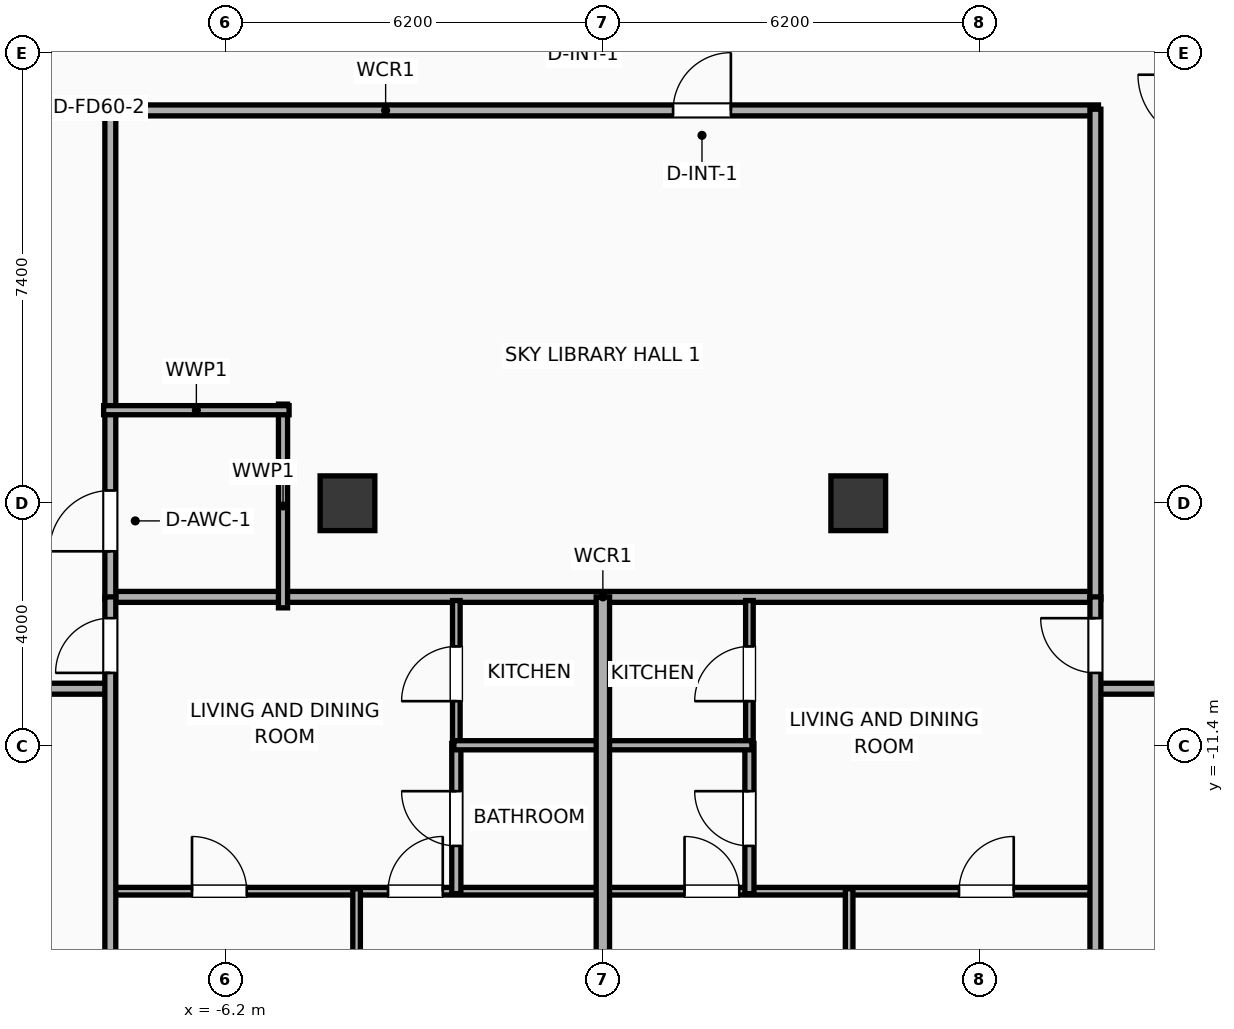
"""IFC4 building model, lengths in metres.
Left out: names, types, materials, properties, quantities, classifications, styles, units other than length and angle.
Written with IfcOpenShell. Run it as: python <this file> out.ifc"""

import sys

from ifc_helpers import new_model, si_unit, direction, frame, frame_2d, origin, origin_2d, place, context, subcontext, project, spatial, rectangle, extrude, element, fill, save


model = new_model("IFC4")
c1 = context("Model", 3, precision=1e-05, world=origin(), true_north=direction((0.0, 1.0)))
c2 = subcontext(c1, "Body", "Model", "MODEL_VIEW")
j1 = project(units=[si_unit("LENGTHUNIT", "METRE"), si_unit("PLANEANGLEUNIT", "RADIAN")], contexts=[c1])
p1 = place(None, origin())
s1 = spatial("IfcSite", under=j1, at=p1, CompositionType="ELEMENT")
p2 = place(p1, origin())
s2 = spatial("IfcBuilding", under=s1, at=p2, CompositionType="ELEMENT")
p3 = place(p2, frame((0.0, 0.0, 156.0)))
s3 = spatial("IfcBuildingStorey", under=s2, at=p3, CompositionType="ELEMENT", Elevation=156.0)
for number, where, z_axis, x_axis in (
    (1, (-4.2, -7.4, 0.0), (0.0, 0.0, 1.0), (1.0, 0.0, 0.0)),
    (2, (4.2, -7.4, 0.0), (0.0, 0.0, 1.0), (1.0, 0.0, 0.0)),
):
    element("IfcColumn", number, at=place(p3, frame(where, z_axis=z_axis, x_axis=x_axis)), inside=s3, PredefinedType="COLUMN", context=c2, shape_type="SweptSolid", body=[
        extrude(rectangle(XDim=0.9, YDim=0.9, at=origin_2d()), origin(), (0.0, 0.0, 1.0), 3.9),
    ])
p4 = place(p3, frame((-8.15, -8.94, 0.0), z_axis=(0.0, 0.0, 1.0), x_axis=(1.0, 0.0, 0.0)))
e3 = element("IfcWall", 3, at=p4, inside=s3, PredefinedType="PARTITIONING", context=c2, shape_type="SweptSolid", body=[
    extrude(rectangle(XDim=16.3, YDim=0.18, at=frame_2d((8.15, 0.0))), origin(), (0.0, 0.0, 1.0), 3.65),
])
p5 = place(p3, frame((-8.15, -0.94, 0.0), z_axis=(0.0, 0.0, 1.0), x_axis=(1.0, 0.0, 0.0)))
e4 = element("IfcWall", 4, at=p5, inside=s3, PredefinedType="PARTITIONING", context=c2, shape_type="SweptSolid", body=[
    extrude(rectangle(XDim=16.3, YDim=0.18, at=frame_2d((8.15, 0.0))), origin(), (0.0, 0.0, 1.0), 3.65),
])
p6 = place(p5, frame((9.305, 0.0, 0.0)))
e5 = element("IfcOpeningElement", 5, at=p6, cuts=e4, PredefinedType="OPENING", context=c2, shape_type="SweptSolid", body=[
    extrude(rectangle(XDim=0.95, YDim=2.05, at=frame_2d((0.475, 1.025))), frame((0.0, 0.1, 0.0), z_axis=(0.0, -1.0, 0.0), x_axis=(1.0, 0.0, 0.0)), (0.0, 0.0, 1.0), 0.2),
])
p7 = place(p3, frame((-8.1, -8.98, 0.0), z_axis=(0.0, 0.0, 1.0), x_axis=(0.0, 1.0, 0.0)))
e6 = element("IfcWall", 6, at=p7, inside=s3, PredefinedType="PARTITIONING", context=c2, shape_type="SweptSolid", body=[
    extrude(rectangle(XDim=8.06, YDim=0.18, at=frame_2d((4.03, 0.0))), origin(), (0.0, 0.0, 1.0), 3.65),
])
p8 = place(p7, frame((0.79, 0.0, 0.0)))
e7 = element("IfcOpeningElement", 7, at=p8, cuts=e6, PredefinedType="OPENING", context=c2, shape_type="SweptSolid", body=[
    extrude(rectangle(XDim=1.0, YDim=2.05, at=frame_2d((0.5, 1.025))), frame((0.0, 0.1, 0.0), z_axis=(0.0, -1.0, 0.0), x_axis=(1.0, 0.0, 0.0)), (0.0, 0.0, 1.0), 0.2),
])
p9 = place(p3, frame((8.1, -8.98, 0.0), z_axis=(0.0, 0.0, 1.0), x_axis=(0.0, 1.0, 0.0)))
e8 = element("IfcWall", 8, at=p9, inside=s3, PredefinedType="PARTITIONING", context=c2, shape_type="SweptSolid", body=[
    extrude(rectangle(XDim=8.06, YDim=0.18, at=frame_2d((4.03, 0.0))), origin(), (0.0, 0.0, 1.0), 3.65),
])
p10 = place(p3, frame((-5.26, -9.12, 0.0), z_axis=(0.0, 0.0, 1.0), x_axis=(0.0, 1.0, 0.0)))
e9 = element("IfcWall", 9, at=p10, inside=s3, PredefinedType="PLUMBINGWALL", context=c2, shape_type="SweptSolid", body=[
    extrude(rectangle(XDim=3.35, YDim=0.15, at=frame_2d((1.675, 0.0))), origin(), (0.0, 0.0, 1.0), 3.65),
])
p11 = place(p3, frame((-8.21, -5.87, 0.0), z_axis=(0.0, 0.0, 1.0), x_axis=(1.0, 0.0, 0.0)))
e10 = element("IfcWall", 10, at=p11, inside=s3, PredefinedType="PLUMBINGWALL", context=c2, shape_type="SweptSolid", body=[
    extrude(rectangle(XDim=3.05, YDim=0.15, at=frame_2d((1.525, 0.0))), origin(), (0.0, 0.0, 1.0), 3.65),
])
p12 = place(p3, frame((-19.75, -10.45, 0.0), z_axis=(0.0, 0.0, 1.0), x_axis=(1.0, 0.0, 0.0)))
e11 = element("IfcWall", 11, at=p12, inside=s3, PredefinedType="PARTITIONING", context=c2, shape_type="SweptSolid", body=[
    extrude(rectangle(XDim=11.67, YDim=0.18, at=frame_2d((5.835, 0.0))), origin(), (0.0, 0.0, 1.0), 3.65),
])
p13 = place(p12, frame((2.664, 0.0, 0.0)))
e12 = element("IfcOpeningElement", 12, at=p13, cuts=e11, PredefinedType="OPENING", context=c2, shape_type="SweptSolid", body=[
    extrude(rectangle(XDim=0.9, YDim=2.05, at=frame_2d((0.45, 1.025))), frame((0.0, 0.1, 0.0), z_axis=(0.0, -1.0, 0.0), x_axis=(1.0, 0.0, 0.0)), (0.0, 0.0, 1.0), 0.2),
])
p14 = place(p12, frame((9.404, 0.0, 0.0)))
e13 = element("IfcOpeningElement", 13, at=p14, cuts=e11, PredefinedType="OPENING", context=c2, shape_type="SweptSolid", body=[
    extrude(rectangle(XDim=1.15, YDim=2.05, at=frame_2d((0.575, 1.025))), frame((0.0, 0.1, 0.0), z_axis=(0.0, -1.0, 0.0), x_axis=(1.0, 0.0, 0.0)), (0.0, 0.0, 1.0), 0.2),
])
p15 = place(p3, frame((8.08, -10.45, 0.0), z_axis=(0.0, 0.0, 1.0), x_axis=(1.0, 0.0, 0.0)))
e14 = element("IfcWall", 14, at=p15, inside=s3, PredefinedType="PARTITIONING", context=c2, shape_type="SweptSolid", body=[
    extrude(rectangle(XDim=11.67, YDim=0.18, at=frame_2d((5.835, 0.0))), origin(), (0.0, 0.0, 1.0), 3.65),
])
p16 = place(p15, frame((1.213, 0.0, 0.0)))
e15 = element("IfcOpeningElement", 15, at=p16, cuts=e14, PredefinedType="OPENING", context=c2, shape_type="SweptSolid", body=[
    extrude(rectangle(XDim=1.15, YDim=2.05, at=frame_2d((0.575, 1.025))), frame((0.0, 0.1, 0.0), z_axis=(0.0, -1.0, 0.0), x_axis=(1.0, 0.0, 0.0)), (0.0, 0.0, 1.0), 0.2),
])
p17 = place(p15, frame((7.057, 0.0, 0.0)))
e16 = element("IfcOpeningElement", 16, at=p17, cuts=e14, PredefinedType="OPENING", context=c2, shape_type="SweptSolid", body=[
    extrude(rectangle(XDim=1.15, YDim=2.05, at=frame_2d((0.575, 1.025))), frame((0.0, 0.1, 0.0), z_axis=(0.0, -1.0, 0.0), x_axis=(1.0, 0.0, 0.0)), (0.0, 0.0, 1.0), 0.2),
])
p18 = place(p3, frame((-8.08, -13.78, 0.0), z_axis=(0.0, 0.0, 1.0), x_axis=(1.0, 0.0, 0.0)))
e17 = element("IfcWall", 17, at=p18, inside=s3, PredefinedType="PARTITIONING", context=c2, shape_type="SweptSolid", body=[
    extrude(rectangle(XDim=8.06, YDim=0.125, at=frame_2d((4.03, 0.0))), origin(), (0.0, 0.0, 1.0), 3.65),
])
p19 = place(p18, frame((1.323, 0.0, 0.0)))
e18 = element("IfcOpeningElement", 18, at=p19, cuts=e17, PredefinedType="OPENING", context=c2, shape_type="SweptSolid", body=[
    extrude(rectangle(XDim=0.9, YDim=2.05, at=frame_2d((0.45, 1.025))), frame((0.0, 0.073, 0.0), z_axis=(0.0, -1.0, 0.0), x_axis=(1.0, 0.0, 0.0)), (0.0, 0.0, 1.0), 0.145),
])
p20 = place(p18, frame((4.547, 0.0, 0.0)))
e19 = element("IfcOpeningElement", 19, at=p20, cuts=e17, PredefinedType="OPENING", context=c2, shape_type="SweptSolid", body=[
    extrude(rectangle(XDim=0.9, YDim=2.05, at=frame_2d((0.45, 1.025))), frame((0.0, 0.073, 0.0), z_axis=(0.0, -1.0, 0.0), x_axis=(1.0, 0.0, 0.0)), (0.0, 0.0, 1.0), 0.145),
])
p21 = place(p3, frame((-2.41, -11.41, 0.0), z_axis=(0.0, 0.0, 1.0), x_axis=(0.0, 1.0, 0.0)))
e20 = element("IfcWall", 20, at=p21, inside=s3, PredefinedType="PARTITIONING", context=c2, shape_type="SweptSolid", body=[
    extrude(rectangle(XDim=2.41, YDim=0.125, at=frame_2d((1.205, 0.0))), origin(), (0.0, 0.0, 1.0), 3.65),
])
p22 = place(p21, frame((0.755, 0.0, 0.0)))
e21 = element("IfcOpeningElement", 21, at=p22, cuts=e20, PredefinedType="OPENING", context=c2, shape_type="SweptSolid", body=[
    extrude(rectangle(XDim=0.9, YDim=2.05, at=frame_2d((0.45, 1.025))), frame((0.0, 0.073, 0.0), z_axis=(0.0, -1.0, 0.0), x_axis=(1.0, 0.0, 0.0)), (0.0, 0.0, 1.0), 0.145),
])
p23 = place(p3, frame((-2.41, -13.82, 0.0), z_axis=(0.0, 0.0, 1.0), x_axis=(0.0, 1.0, 0.0)))
e22 = element("IfcWall", 22, at=p23, inside=s3, PredefinedType="PLUMBINGWALL", context=c2, shape_type="SweptSolid", body=[
    extrude(rectangle(XDim=2.47, YDim=0.15, at=frame_2d((1.235, 0.0))), origin(), (0.0, 0.0, 1.0), 3.65),
])
p24 = place(p23, frame((0.785, 0.0, 0.0)))
e23 = element("IfcOpeningElement", 23, at=p24, cuts=e22, PredefinedType="OPENING", context=c2, shape_type="SweptSolid", body=[
    extrude(rectangle(XDim=0.9, YDim=2.05, at=frame_2d((0.45, 1.025))), frame((0.0, 0.085, 0.0), z_axis=(0.0, -1.0, 0.0), x_axis=(1.0, 0.0, 0.0)), (0.0, 0.0, 1.0), 0.17),
])
p25 = place(p3, frame((-2.45, -11.38, 0.0), z_axis=(0.0, 0.0, 1.0), x_axis=(1.0, 0.0, 0.0)))
e24 = element("IfcWall", 24, at=p25, inside=s3, PredefinedType="PLUMBINGWALL", context=c2, shape_type="SweptSolid", body=[
    extrude(rectangle(XDim=2.43, YDim=0.15, at=frame_2d((1.215, 0.0))), origin(), (0.0, 0.0, 1.0), 3.65),
])
p26 = place(p3, frame((-4.05, -21.031, 0.0), z_axis=(0.0, 0.0, 1.0), x_axis=(0.0, 1.0, 0.0)))
e25 = element("IfcWall", 25, at=p26, inside=s3, PredefinedType="PARTITIONING", context=c2, shape_type="SweptSolid", body=[
    extrude(rectangle(XDim=7.291, YDim=0.125, at=frame_2d((3.646, 0.0))), origin(), (0.0, 0.0, 1.0), 3.65),
])
p27 = place(p3, frame((-8.1, -21.456, 0.0), z_axis=(0.0, 0.0, 1.0), x_axis=(0.0, 1.0, 0.0)))
e26 = element("IfcWall", 26, at=p27, inside=s3, PredefinedType="PARTITIONING", context=c2, shape_type="SweptSolid", body=[
    extrude(rectangle(XDim=12.516, YDim=0.18, at=frame_2d((6.258, 0.0))), origin(), (0.0, 0.0, 1.0), 3.65),
])
p28 = place(p27, frame((11.267, 0.0, 0.0)))
e27 = element("IfcOpeningElement", 27, at=p28, cuts=e26, PredefinedType="OPENING", context=c2, shape_type="SweptSolid", body=[
    extrude(rectangle(XDim=0.9, YDim=2.05, at=frame_2d((0.45, 1.025))), frame((0.0, 0.1, 0.0), z_axis=(0.0, -1.0, 0.0), x_axis=(1.0, 0.0, 0.0)), (0.0, 0.0, 1.0), 0.2),
])
p29 = place(p3, frame((0.02, -13.78, 0.0), z_axis=(0.0, 0.0, 1.0), x_axis=(1.0, 0.0, 0.0)))
e28 = element("IfcWall", 28, at=p29, inside=s3, PredefinedType="PARTITIONING", context=c2, shape_type="SweptSolid", body=[
    extrude(rectangle(XDim=8.06, YDim=0.125, at=frame_2d((4.03, 0.0))), origin(), (0.0, 0.0, 1.0), 3.65),
])
p30 = place(p29, frame((1.323, 0.0, 0.0)))
e29 = element("IfcOpeningElement", 29, at=p30, cuts=e28, PredefinedType="OPENING", context=c2, shape_type="SweptSolid", body=[
    extrude(rectangle(XDim=0.9, YDim=2.05, at=frame_2d((0.45, 1.025))), frame((0.0, 0.073, 0.0), z_axis=(0.0, -1.0, 0.0), x_axis=(1.0, 0.0, 0.0)), (0.0, 0.0, 1.0), 0.145),
])
p31 = place(p29, frame((5.837, 0.0, 0.0)))
e30 = element("IfcOpeningElement", 30, at=p31, cuts=e28, PredefinedType="OPENING", context=c2, shape_type="SweptSolid", body=[
    extrude(rectangle(XDim=0.9, YDim=2.05, at=frame_2d((0.45, 1.025))), frame((0.0, 0.073, 0.0), z_axis=(0.0, -1.0, 0.0), x_axis=(1.0, 0.0, 0.0)), (0.0, 0.0, 1.0), 0.145),
])
p32 = place(p3, frame((2.41, -11.41, 0.0), z_axis=(0.0, 0.0, 1.0), x_axis=(0.0, 1.0, 0.0)))
e31 = element("IfcWall", 31, at=p32, inside=s3, PredefinedType="PARTITIONING", context=c2, shape_type="SweptSolid", body=[
    extrude(rectangle(XDim=2.41, YDim=0.125, at=frame_2d((1.205, 0.0))), origin(), (0.0, 0.0, 1.0), 3.65),
])
p33 = place(p32, frame((0.755, 0.0, 0.0)))
e32 = element("IfcOpeningElement", 32, at=p33, cuts=e31, PredefinedType="OPENING", context=c2, shape_type="SweptSolid", body=[
    extrude(rectangle(XDim=0.9, YDim=2.05, at=frame_2d((0.45, 1.025))), frame((0.0, 0.073, 0.0), z_axis=(0.0, -1.0, 0.0), x_axis=(1.0, 0.0, 0.0)), (0.0, 0.0, 1.0), 0.145),
])
p34 = place(p3, frame((2.41, -13.82, 0.0), z_axis=(0.0, 0.0, 1.0), x_axis=(0.0, 1.0, 0.0)))
e33 = element("IfcWall", 33, at=p34, inside=s3, PredefinedType="PLUMBINGWALL", context=c2, shape_type="SweptSolid", body=[
    extrude(rectangle(XDim=2.47, YDim=0.15, at=frame_2d((1.235, 0.0))), origin(), (0.0, 0.0, 1.0), 3.65),
])
p35 = place(p34, frame((0.785, 0.0, 0.0)))
e34 = element("IfcOpeningElement", 34, at=p35, cuts=e33, PredefinedType="OPENING", context=c2, shape_type="SweptSolid", body=[
    extrude(rectangle(XDim=0.9, YDim=2.05, at=frame_2d((0.45, 1.025))), frame((0.0, 0.085, 0.0), z_axis=(0.0, -1.0, 0.0), x_axis=(1.0, 0.0, 0.0)), (0.0, 0.0, 1.0), 0.17),
])
p36 = place(p3, frame((0.02, -11.38, 0.0), z_axis=(0.0, 0.0, 1.0), x_axis=(1.0, 0.0, 0.0)))
e35 = element("IfcWall", 35, at=p36, inside=s3, PredefinedType="PLUMBINGWALL", context=c2, shape_type="SweptSolid", body=[
    extrude(rectangle(XDim=2.43, YDim=0.15, at=frame_2d((1.215, 0.0))), origin(), (0.0, 0.0, 1.0), 3.65),
])
p37 = place(p3, frame((4.05, -20.179, 0.0), z_axis=(0.0, 0.0, 1.0), x_axis=(0.0, 1.0, 0.0)))
e36 = element("IfcWall", 36, at=p37, inside=s3, PredefinedType="PARTITIONING", context=c2, shape_type="SweptSolid", body=[
    extrude(rectangle(XDim=6.439, YDim=0.125, at=frame_2d((3.22, 0.0))), origin(), (0.0, 0.0, 1.0), 3.04),
])
p38 = place(p3, frame((8.1, -19.754, 0.0), z_axis=(0.0, 0.0, 1.0), x_axis=(0.0, 1.0, 0.0)))
e37 = element("IfcWall", 37, at=p38, inside=s3, PredefinedType="PARTITIONING", context=c2, shape_type="SweptSolid", body=[
    extrude(rectangle(XDim=10.814, YDim=0.18, at=frame_2d((5.407, 0.0))), origin(), (0.0, 0.0, 1.0), 3.65),
])
p39 = place(p38, frame((9.564, 0.0, 0.0)))
e38 = element("IfcOpeningElement", 38, at=p39, cuts=e37, PredefinedType="OPENING", context=c2, shape_type="SweptSolid", body=[
    extrude(rectangle(XDim=0.9, YDim=2.05, at=frame_2d((0.45, 1.025))), frame((0.0, 0.1, 0.0), z_axis=(0.0, -1.0, 0.0), x_axis=(1.0, 0.0, 0.0)), (0.0, 0.0, 1.0), 0.2),
])
p40 = place(p3, frame((0.0, -20.605, 0.0), z_axis=(0.0, 0.0, 1.0), x_axis=(0.0, 1.0, 0.0)))
e39 = element("IfcWall", 39, at=p40, inside=s3, PredefinedType="PARTITIONING", context=c2, shape_type="SweptSolid", body=[
    extrude(rectangle(XDim=11.665, YDim=0.22, at=frame_2d((5.833, 0.0))), origin(), (0.0, 0.0, 1.0), 3.65),
])
p41 = place(p6, origin())
e40 = element("IfcDoor", 40, at=p41, inside=s3, OperationType="SINGLE_SWING_RIGHT", PredefinedType="DOOR", context=c2, shape_type="SweptSolid", body=[
    extrude(rectangle(XDim=0.95, YDim=2.05, at=frame_2d((0.475, 1.025))), frame((0.0, 0.025, 0.0), z_axis=(0.0, -1.0, 0.0), x_axis=(1.0, 0.0, 0.0)), (0.0, 0.0, 1.0), 0.05),
])
fill(e5, e40)
p42 = place(p8, origin())
e41 = element("IfcDoor", 41, at=p42, inside=s3, OperationType="SINGLE_SWING_LEFT", PredefinedType="DOOR", context=c2, shape_type="SweptSolid", body=[
    extrude(rectangle(XDim=1.0, YDim=2.05, at=frame_2d((0.5, 1.025))), frame((0.0, 0.025, 0.0), z_axis=(0.0, -1.0, 0.0), x_axis=(1.0, 0.0, 0.0)), (0.0, 0.0, 1.0), 0.05),
])
fill(e7, e41)
p43 = place(p19, origin())
e42 = element("IfcDoor", 42, at=p43, inside=s3, OperationType="SINGLE_SWING_LEFT", PredefinedType="DOOR", context=c2, shape_type="SweptSolid", body=[
    extrude(rectangle(XDim=0.9, YDim=2.05, at=frame_2d((0.45, 1.025))), frame((0.0, 0.025, 0.0), z_axis=(0.0, -1.0, 0.0), x_axis=(1.0, 0.0, 0.0)), (0.0, 0.0, 1.0), 0.05),
])
fill(e18, e42)
p44 = place(p20, origin())
e43 = element("IfcDoor", 43, at=p44, inside=s3, OperationType="SINGLE_SWING_RIGHT", PredefinedType="DOOR", context=c2, shape_type="SweptSolid", body=[
    extrude(rectangle(XDim=0.9, YDim=2.05, at=frame_2d((0.45, 1.025))), frame((0.0, 0.025, 0.0), z_axis=(0.0, -1.0, 0.0), x_axis=(1.0, 0.0, 0.0)), (0.0, 0.0, 1.0), 0.05),
])
fill(e19, e43)
p45 = place(p22, origin())
e44 = element("IfcDoor", 44, at=p45, inside=s3, OperationType="SINGLE_SWING_LEFT", PredefinedType="DOOR", context=c2, shape_type="SweptSolid", body=[
    extrude(rectangle(XDim=0.9, YDim=2.05, at=frame_2d((0.45, 1.025))), frame((0.0, 0.025, 0.0), z_axis=(0.0, -1.0, 0.0), x_axis=(1.0, 0.0, 0.0)), (0.0, 0.0, 1.0), 0.05),
])
fill(e21, e44)
p46 = place(p24, origin())
e45 = element("IfcDoor", 45, at=p46, inside=s3, OperationType="SINGLE_SWING_RIGHT", PredefinedType="DOOR", context=c2, shape_type="SweptSolid", body=[
    extrude(rectangle(XDim=0.9, YDim=2.05, at=frame_2d((0.45, 1.025))), frame((0.0, 0.025, 0.0), z_axis=(0.0, -1.0, 0.0), x_axis=(1.0, 0.0, 0.0)), (0.0, 0.0, 1.0), 0.05),
])
fill(e23, e45)
p47 = place(p28, origin())
e46 = element("IfcDoor", 46, at=p47, inside=s3, OperationType="SINGLE_SWING_LEFT", PredefinedType="DOOR", context=c2, shape_type="SweptSolid", body=[
    extrude(rectangle(XDim=0.9, YDim=2.05, at=frame_2d((0.45, 1.025))), frame((0.0, 0.025, 0.0), z_axis=(0.0, -1.0, 0.0), x_axis=(1.0, 0.0, 0.0)), (0.0, 0.0, 1.0), 0.05),
])
fill(e27, e46)
p48 = place(p30, origin())
e47 = element("IfcDoor", 47, at=p48, inside=s3, OperationType="SINGLE_SWING_LEFT", PredefinedType="DOOR", context=c2, shape_type="SweptSolid", body=[
    extrude(rectangle(XDim=0.9, YDim=2.05, at=frame_2d((0.45, 1.025))), frame((0.0, 0.025, 0.0), z_axis=(0.0, -1.0, 0.0), x_axis=(1.0, 0.0, 0.0)), (0.0, 0.0, 1.0), 0.05),
])
fill(e29, e47)
p49 = place(p31, origin())
e48 = element("IfcDoor", 48, at=p49, inside=s3, OperationType="SINGLE_SWING_RIGHT", PredefinedType="DOOR", context=c2, shape_type="SweptSolid", body=[
    extrude(rectangle(XDim=0.9, YDim=2.05, at=frame_2d((0.45, 1.025))), frame((0.0, 0.025, 0.0), z_axis=(0.0, -1.0, 0.0), x_axis=(1.0, 0.0, 0.0)), (0.0, 0.0, 1.0), 0.05),
])
fill(e30, e48)
p50 = place(p33, origin())
e49 = element("IfcDoor", 49, at=p50, inside=s3, OperationType="SINGLE_SWING_LEFT", PredefinedType="DOOR", context=c2, shape_type="SweptSolid", body=[
    extrude(rectangle(XDim=0.9, YDim=2.05, at=frame_2d((0.45, 1.025))), frame((0.0, 0.025, 0.0), z_axis=(0.0, -1.0, 0.0), x_axis=(1.0, 0.0, 0.0)), (0.0, 0.0, 1.0), 0.05),
])
fill(e32, e49)
p51 = place(p35, origin())
e50 = element("IfcDoor", 50, at=p51, inside=s3, OperationType="SINGLE_SWING_RIGHT", PredefinedType="DOOR", context=c2, shape_type="SweptSolid", body=[
    extrude(rectangle(XDim=0.9, YDim=2.05, at=frame_2d((0.45, 1.025))), frame((0.0, 0.025, 0.0), z_axis=(0.0, -1.0, 0.0), x_axis=(1.0, 0.0, 0.0)), (0.0, 0.0, 1.0), 0.05),
])
fill(e34, e50)
p52 = place(p39, origin())
e51 = element("IfcDoor", 51, at=p52, inside=s3, OperationType="SINGLE_SWING_RIGHT", PredefinedType="DOOR", context=c2, shape_type="SweptSolid", body=[
    extrude(rectangle(XDim=0.9, YDim=2.05, at=frame_2d((0.45, 1.025))), frame((0.0, 0.025, 0.0), z_axis=(0.0, -1.0, 0.0), x_axis=(1.0, 0.0, 0.0)), (0.0, 0.0, 1.0), 0.05),
])
fill(e38, e51)
save(model, sys.argv[1])
